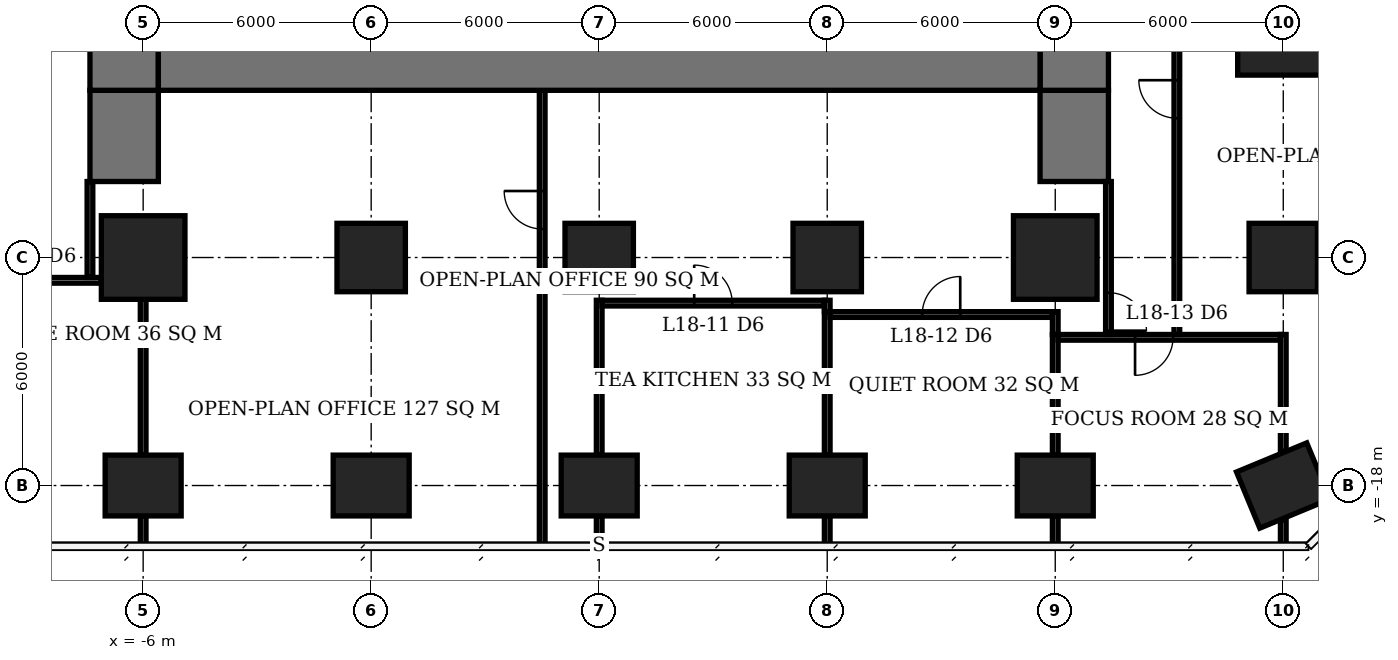
"""IFC4 building model, lengths in metres.
Left out: names, types, materials, properties, quantities, classifications, styles, units other than length and angle.
Written with IfcOpenShell. Run it as: python <this file> out.ifc"""

import sys

from ifc_helpers import new_model, si_unit, direction, frame, frame_2d, origin, origin_2d, place, context, subcontext, project, spatial, rectangle, extrude, element, fill, save


model = new_model("IFC4")
c1 = context("Model", 3, precision=1e-05, world=origin(), true_north=direction((0.0, 1.0)))
c2 = subcontext(c1, "Body", "Model", "MODEL_VIEW")
j1 = project(units=[si_unit("LENGTHUNIT", "METRE"), si_unit("PLANEANGLEUNIT", "RADIAN")], contexts=[c1])
p1 = place(None, origin())
s1 = spatial("IfcSite", under=j1, at=p1, CompositionType="ELEMENT")
p2 = place(p1, origin())
s2 = spatial("IfcBuilding", under=s1, at=p2, CompositionType="ELEMENT")
p3 = place(p2, frame((0.0, 0.0, 76.7)))
s3 = spatial("IfcBuildingStorey", under=s2, at=p3, CompositionType="ELEMENT", Elevation=76.7)
p4 = place(p3, frame((-6.0, -18.0, 0.0), z_axis=(0.0, 0.0, 1.0), x_axis=(1.0, 0.0, 0.0)))
e1 = element("IfcColumn", 1, at=p4, inside=s3, PredefinedType="COLUMN", context=c2, shape_type="SweptSolid", body=[
    extrude(rectangle(XDim=2.0, YDim=1.6, at=origin_2d()), origin(), (0.0, 0.0, 1.0), 3.9),
])
p5 = place(p3, frame((-6.0, -12.0, 0.0), z_axis=(0.0, 0.0, 1.0), x_axis=(1.0, 0.0, 0.0)))
e2 = element("IfcColumn", 2, at=p5, inside=s3, PredefinedType="COLUMN", context=c2, shape_type="SweptSolid", body=[
    extrude(rectangle(XDim=2.2, YDim=2.2, at=origin_2d()), origin(), (0.0, 0.0, 1.0), 3.9),
])
p6 = place(p3, frame((0.0, -18.0, 0.0), z_axis=(0.0, 0.0, 1.0), x_axis=(1.0, 0.0, 0.0)))
e3 = element("IfcColumn", 3, at=p6, inside=s3, PredefinedType="COLUMN", context=c2, shape_type="SweptSolid", body=[
    extrude(rectangle(XDim=2.0, YDim=1.6, at=origin_2d()), origin(), (0.0, 0.0, 1.0), 3.9),
])
p7 = place(p3, frame((0.0, -12.0, 0.0), z_axis=(0.0, 0.0, 1.0), x_axis=(1.0, 0.0, 0.0)))
e4 = element("IfcColumn", 4, at=p7, inside=s3, PredefinedType="COLUMN", context=c2, shape_type="SweptSolid", body=[
    extrude(rectangle(XDim=1.8, YDim=1.8, at=origin_2d()), origin(), (0.0, 0.0, 1.0), 3.9),
])
p8 = place(p3, frame((6.0, -18.0, 0.0), z_axis=(0.0, 0.0, 1.0), x_axis=(1.0, 0.0, 0.0)))
e5 = element("IfcColumn", 5, at=p8, inside=s3, PredefinedType="COLUMN", context=c2, shape_type="SweptSolid", body=[
    extrude(rectangle(XDim=2.0, YDim=1.6, at=origin_2d()), origin(), (0.0, 0.0, 1.0), 3.9),
])
p9 = place(p3, frame((6.0, -12.0, 0.0), z_axis=(0.0, 0.0, 1.0), x_axis=(1.0, 0.0, 0.0)))
e6 = element("IfcColumn", 6, at=p9, inside=s3, PredefinedType="COLUMN", context=c2, shape_type="SweptSolid", body=[
    extrude(rectangle(XDim=1.8, YDim=1.8, at=origin_2d()), origin(), (0.0, 0.0, 1.0), 3.9),
])
p10 = place(p3, frame((12.0, -18.0, 0.0), z_axis=(0.0, 0.0, 1.0), x_axis=(1.0, 0.0, 0.0)))
e7 = element("IfcColumn", 7, at=p10, inside=s3, PredefinedType="COLUMN", context=c2, shape_type="SweptSolid", body=[
    extrude(rectangle(XDim=2.0, YDim=1.6, at=origin_2d()), origin(), (0.0, 0.0, 1.0), 3.9),
])
p11 = place(p3, frame((12.0, -12.0, 0.0), z_axis=(0.0, 0.0, 1.0), x_axis=(1.0, 0.0, 0.0)))
e8 = element("IfcColumn", 8, at=p11, inside=s3, PredefinedType="COLUMN", context=c2, shape_type="SweptSolid", body=[
    extrude(rectangle(XDim=1.8, YDim=1.8, at=origin_2d()), origin(), (0.0, 0.0, 1.0), 3.9),
])
p12 = place(p3, frame((18.0, -18.0, 0.0), z_axis=(0.0, 0.0, 1.0), x_axis=(1.0, 0.0, 0.0)))
e9 = element("IfcColumn", 9, at=p12, inside=s3, PredefinedType="COLUMN", context=c2, shape_type="SweptSolid", body=[
    extrude(rectangle(XDim=2.0, YDim=1.6, at=origin_2d()), origin(), (0.0, 0.0, 1.0), 3.9),
])
p13 = place(p3, frame((18.0, -12.0, 0.0), z_axis=(0.0, 0.0, 1.0), x_axis=(1.0, 0.0, 0.0)))
e10 = element("IfcColumn", 10, at=p13, inside=s3, PredefinedType="COLUMN", context=c2, shape_type="SweptSolid", body=[
    extrude(rectangle(XDim=2.2, YDim=2.2, at=origin_2d()), origin(), (0.0, 0.0, 1.0), 3.9),
])
p14 = place(p3, frame((24.0, -18.0, 0.0), z_axis=(0.0, 0.0, 1.0), x_axis=(-0.923879532511, -0.382683432365, 0.0)))
e11 = element("IfcColumn", 11, at=p14, inside=s3, PredefinedType="COLUMN", context=c2, shape_type="SweptSolid", body=[
    extrude(rectangle(XDim=2.0, YDim=1.6, at=origin_2d()), origin(), (0.0, 0.0, 1.0), 3.9),
])
p15 = place(p3, frame((24.0, -12.0, 0.0), z_axis=(0.0, 0.0, 1.0), x_axis=(1.0, 0.0, 0.0)))
e12 = element("IfcColumn", 12, at=p15, inside=s3, PredefinedType="COLUMN", context=c2, shape_type="SweptSolid", body=[
    extrude(rectangle(XDim=1.8, YDim=1.8, at=origin_2d()), origin(), (0.0, 0.0, 1.0), 3.9),
])
p16 = place(p3, frame((24.0, -6.0, 0.0), z_axis=(0.0, 0.0, 1.0), x_axis=(1.0, 0.0, 0.0)))
e13 = element("IfcColumn", 13, at=p16, inside=s3, PredefinedType="COLUMN", context=c2, shape_type="SweptSolid", body=[
    extrude(rectangle(XDim=2.4, YDim=2.4, at=origin_2d()), origin(), (0.0, 0.0, 1.0), 3.9),
])
p17 = place(p3, frame((-5.6, -6.6, 0.0), z_axis=(0.0, 0.0, 1.0), x_axis=(1.0, 0.0, 0.0)))
e14 = element("IfcWall", 14, at=p17, inside=s3, PredefinedType="SHEAR", context=c2, shape_type="SweptSolid", body=[
    extrude(rectangle(XDim=23.2, YDim=2.0, at=frame_2d((11.6, 0.0))), origin(), (0.0, 0.0, 1.0), 3.9),
])
p18 = place(p3, frame((-6.5, -7.6, 0.0), z_axis=(0.0, 0.0, 1.0), x_axis=(0.0, 1.0, 0.0)))
e15 = element("IfcWall", 15, at=p18, inside=s3, PredefinedType="SHEAR", context=c2, shape_type="SweptSolid", body=[
    extrude(rectangle(XDim=21.2, YDim=1.8, at=frame_2d((10.6, 0.0))), origin(), (0.0, 0.0, 1.0), 3.9),
])
p19 = place(p18, frame((7.8, 0.0, 0.0)))
e16 = element("IfcOpeningElement", 16, at=p19, cuts=e15, PredefinedType="OPENING", context=c2, shape_type="SweptSolid", body=[
    extrude(rectangle(XDim=1.8, YDim=2.4, at=frame_2d((0.9, 1.2))), frame((0.0, 0.91, 0.0), z_axis=(0.0, -1.0, 0.0), x_axis=(1.0, 0.0, 0.0)), (0.0, 0.0, 1.0), 1.82),
])
p20 = place(p3, frame((18.5, -7.6, 0.0), z_axis=(0.0, 0.0, 1.0), x_axis=(0.0, 1.0, 0.0)))
e17 = element("IfcWall", 17, at=p20, inside=s3, PredefinedType="SHEAR", context=c2, shape_type="SweptSolid", body=[
    extrude(rectangle(XDim=21.2, YDim=1.8, at=frame_2d((10.6, 0.0))), origin(), (0.0, 0.0, 1.0), 3.9),
])
p21 = place(p20, frame((9.2, 0.0, 0.0)))
e18 = element("IfcOpeningElement", 18, at=p21, cuts=e17, PredefinedType="OPENING", context=c2, shape_type="SweptSolid", body=[
    extrude(rectangle(XDim=1.8, YDim=2.4, at=frame_2d((0.9, 1.2))), frame((0.0, 0.91, 0.0), z_axis=(0.0, -1.0, 0.0), x_axis=(1.0, 0.0, 0.0)), (0.0, 0.0, 1.0), 1.82),
])
for number, where, z_axis, x_axis in (
    (19, (-6.5, -10.0, 0.0), (0.0, 0.0, 1.0), (0.0, 1.0, 0.0)),
    (20, (18.5, -10.0, 0.0), (0.0, 0.0, 1.0), (0.0, 1.0, 0.0)),
):
    element("IfcWall", number, at=place(p3, frame(where, z_axis=z_axis, x_axis=x_axis)), inside=s3, PredefinedType="SHEAR", context=c2, shape_type="SweptSolid", body=[
        extrude(rectangle(XDim=2.4, YDim=1.8, at=frame_2d((1.2, 0.0))), origin(), (0.0, 0.0, 1.0), 3.9),
    ])
p22 = place(p3, frame((23.925, -14.1, 0.0), z_axis=(0.0, 0.0, 1.0), x_axis=(-1.0, 0.0, 0.0)))
e21 = element("IfcWall", 21, at=p22, inside=s3, PredefinedType="PARTITIONING", context=c2, shape_type="SweptSolid", body=[
    extrude(rectangle(XDim=5.85, YDim=0.15, at=frame_2d((2.925, 0.0))), origin(), (0.0, 0.0, 1.0), 3.65),
])
p23 = place(p22, frame((2.825, 0.0, 0.0)))
e22 = element("IfcOpeningElement", 22, at=p23, cuts=e21, PredefinedType="OPENING", context=c2, shape_type="SweptSolid", body=[
    extrude(rectangle(XDim=1.0, YDim=2.1, at=frame_2d((0.5, 1.05))), frame((0.0, 0.085, 0.0), z_axis=(0.0, -1.0, 0.0), x_axis=(1.0, 0.0, 0.0)), (0.0, 0.0, 1.0), 0.17),
])
p24 = place(p3, frame((12.075, -13.5, 0.0), z_axis=(0.0, 0.0, 1.0), x_axis=(1.0, 0.0, 0.0)))
e23 = element("IfcWall", 23, at=p24, inside=s3, PredefinedType="PARTITIONING", context=c2, shape_type="SweptSolid", body=[
    extrude(rectangle(XDim=5.85, YDim=0.15, at=frame_2d((2.925, 0.0))), origin(), (0.0, 0.0, 1.0), 3.65),
])
p25 = place(p24, frame((2.425, 0.0, 0.0)))
e24 = element("IfcOpeningElement", 24, at=p25, cuts=e23, PredefinedType="OPENING", context=c2, shape_type="SweptSolid", body=[
    extrude(rectangle(XDim=1.0, YDim=2.1, at=frame_2d((0.5, 1.05))), frame((0.0, 0.085, 0.0), z_axis=(0.0, -1.0, 0.0), x_axis=(1.0, 0.0, 0.0)), (0.0, 0.0, 1.0), 0.17),
])
p26 = place(p3, frame((6.075, -13.2, 0.0), z_axis=(0.0, 0.0, 1.0), x_axis=(1.0, 0.0, 0.0)))
e25 = element("IfcWall", 25, at=p26, inside=s3, PredefinedType="PARTITIONING", context=c2, shape_type="SweptSolid", body=[
    extrude(rectangle(XDim=5.85, YDim=0.15, at=frame_2d((2.925, 0.0))), origin(), (0.0, 0.0, 1.0), 3.65),
])
p27 = place(p26, frame((2.425, 0.0, 0.0)))
e26 = element("IfcOpeningElement", 26, at=p27, cuts=e25, PredefinedType="OPENING", context=c2, shape_type="SweptSolid", body=[
    extrude(rectangle(XDim=1.0, YDim=2.1, at=frame_2d((0.5, 1.05))), frame((0.0, 0.085, 0.0), z_axis=(0.0, -1.0, 0.0), x_axis=(1.0, 0.0, 0.0)), (0.0, 0.0, 1.0), 0.17),
])
p28 = place(p3, frame((-7.1, -12.6, 0.0), z_axis=(0.0, 0.0, 1.0), x_axis=(-1.0, 0.0, 0.0)))
e27 = element("IfcWall", 27, at=p28, inside=s3, PredefinedType="PARTITIONING", context=c2, shape_type="SweptSolid", body=[
    extrude(rectangle(XDim=4.0, YDim=0.15, at=frame_2d((2.0, 0.0))), origin(), (0.0, 0.0, 1.0), 3.65),
])
p29 = place(p28, frame((1.5, 0.0, 0.0)))
e28 = element("IfcOpeningElement", 28, at=p29, cuts=e27, PredefinedType="OPENING", context=c2, shape_type="SweptSolid", body=[
    extrude(rectangle(XDim=1.0, YDim=2.1, at=frame_2d((0.5, 1.05))), frame((0.0, 0.085, 0.0), z_axis=(0.0, -1.0, 0.0), x_axis=(1.0, 0.0, 0.0)), (0.0, 0.0, 1.0), 0.17),
])
p30 = place(p3, frame((-6.0, -19.6, 0.0), z_axis=(0.0, 0.0, 1.0), x_axis=(0.0, 1.0, 0.0)))
e29 = element("IfcWall", 29, at=p30, inside=s3, PredefinedType="PARTITIONING", context=c2, shape_type="SweptSolid", body=[
    extrude(rectangle(XDim=0.8, YDim=0.15, at=frame_2d((0.4, 0.0))), origin(), (0.0, 0.0, 1.0), 3.65),
])
p31 = place(p3, frame((-6.0, -17.2, 0.0), z_axis=(0.0, 0.0, 1.0), x_axis=(0.0, 1.0, 0.0)))
e30 = element("IfcWall", 30, at=p31, inside=s3, PredefinedType="PARTITIONING", context=c2, shape_type="SweptSolid", body=[
    extrude(rectangle(XDim=4.1, YDim=0.15, at=frame_2d((2.05, 0.0))), origin(), (0.0, 0.0, 1.0), 3.65),
])
p32 = place(p3, frame((6.0, -19.55, 0.0), z_axis=(0.0, 0.0, 1.0), x_axis=(0.0, 1.0, 0.0)))
e31 = element("IfcWall", 31, at=p32, inside=s3, PredefinedType="PARTITIONING", context=c2, shape_type="SweptSolid", body=[
    extrude(rectangle(XDim=0.75, YDim=0.15, at=frame_2d((0.375, 0.0))), origin(), (0.0, 0.0, 1.0), 3.65),
])
p33 = place(p3, frame((6.0, -17.2, 0.0), z_axis=(0.0, 0.0, 1.0), x_axis=(0.0, 1.0, 0.0)))
e32 = element("IfcWall", 32, at=p33, inside=s3, PredefinedType="PARTITIONING", context=c2, shape_type="SweptSolid", body=[
    extrude(rectangle(XDim=4.075, YDim=0.15, at=frame_2d((2.038, 0.0))), origin(), (0.0, 0.0, 1.0), 3.65),
])
p34 = place(p3, frame((12.0, -19.6, 0.0), z_axis=(0.0, 0.0, 1.0), x_axis=(0.0, 1.0, 0.0)))
e33 = element("IfcWall", 33, at=p34, inside=s3, PredefinedType="PARTITIONING", context=c2, shape_type="SweptSolid", body=[
    extrude(rectangle(XDim=0.8, YDim=0.15, at=frame_2d((0.4, 0.0))), origin(), (0.0, 0.0, 1.0), 3.65),
])
p35 = place(p3, frame((12.0, -17.2, 0.0), z_axis=(0.0, 0.0, 1.0), x_axis=(0.0, 1.0, 0.0)))
e34 = element("IfcWall", 34, at=p35, inside=s3, PredefinedType="PARTITIONING", context=c2, shape_type="SweptSolid", body=[
    extrude(rectangle(XDim=3.775, YDim=0.15, at=frame_2d((1.887, 0.0))), origin(), (0.0, 0.0, 1.0), 3.65),
])
p36 = place(p3, frame((12.0, -13.425, 0.0), z_axis=(0.0, 0.0, 1.0), x_axis=(0.0, 1.0, 0.0)))
e35 = element("IfcWall", 35, at=p36, inside=s3, PredefinedType="PARTITIONING", context=c2, shape_type="SweptSolid", body=[
    extrude(rectangle(XDim=0.3, YDim=0.15, at=frame_2d((0.15, 0.0))), origin(), (0.0, 0.0, 1.0), 3.65),
])
p37 = place(p3, frame((18.0, -19.6, 0.0), z_axis=(0.0, 0.0, 1.0), x_axis=(0.0, 1.0, 0.0)))
e36 = element("IfcWall", 36, at=p37, inside=s3, PredefinedType="PARTITIONING", context=c2, shape_type="SweptSolid", body=[
    extrude(rectangle(XDim=0.8, YDim=0.15, at=frame_2d((0.4, 0.0))), origin(), (0.0, 0.0, 1.0), 3.65),
])
p38 = place(p3, frame((18.0, -17.2, 0.0), z_axis=(0.0, 0.0, 1.0), x_axis=(0.0, 1.0, 0.0)))
e37 = element("IfcWall", 37, at=p38, inside=s3, PredefinedType="PARTITIONING", context=c2, shape_type="SweptSolid", body=[
    extrude(rectangle(XDim=3.175, YDim=0.15, at=frame_2d((1.587, 0.0))), origin(), (0.0, 0.0, 1.0), 3.65),
])
p39 = place(p3, frame((18.0, -14.025, 0.0), z_axis=(0.0, 0.0, 1.0), x_axis=(0.0, 1.0, 0.0)))
e38 = element("IfcWall", 38, at=p39, inside=s3, PredefinedType="PARTITIONING", context=c2, shape_type="SweptSolid", body=[
    extrude(rectangle(XDim=0.6, YDim=0.15, at=frame_2d((0.3, 0.0))), origin(), (0.0, 0.0, 1.0), 3.65),
])
p40 = place(p3, frame((24.0, -19.6, 0.0), z_axis=(0.0, 0.0, 1.0), x_axis=(0.0, 1.0, 0.0)))
e39 = element("IfcWall", 39, at=p40, inside=s3, PredefinedType="PARTITIONING", context=c2, shape_type="SweptSolid", body=[
    extrude(rectangle(XDim=0.703, YDim=0.15, at=frame_2d((0.352, 0.0))), origin(), (0.0, 0.0, 1.0), 3.65),
])
p41 = place(p3, frame((24.0, -17.103, 0.0), z_axis=(0.0, 0.0, 1.0), x_axis=(0.0, 1.0, 0.0)))
e40 = element("IfcWall", 40, at=p41, inside=s3, PredefinedType="PARTITIONING", context=c2, shape_type="SweptSolid", body=[
    extrude(rectangle(XDim=3.078, YDim=0.15, at=frame_2d((1.539, 0.0))), origin(), (0.0, 0.0, 1.0), 3.65),
])
p42 = place(p3, frame((-7.4, -12.525, 0.0), z_axis=(0.0, 0.0, 1.0), x_axis=(0.0, 1.0, 0.0)))
e41 = element("IfcWall", 41, at=p42, inside=s3, PredefinedType="PARTITIONING", context=c2, shape_type="SweptSolid", body=[
    extrude(rectangle(XDim=2.525, YDim=0.15, at=frame_2d((1.262, 0.0))), origin(), (0.0, 0.0, 1.0), 3.65),
])
p43 = place(p3, frame((4.5, -19.6, 0.0), z_axis=(0.0, 0.0, 1.0), x_axis=(0.0, 1.0, 0.0)))
e42 = element("IfcWall", 42, at=p43, inside=s3, PredefinedType="PARTITIONING", context=c2, shape_type="SweptSolid", body=[
    extrude(rectangle(XDim=12.0, YDim=0.15, at=frame_2d((6.0, 0.0))), origin(), (0.0, 0.0, 1.0), 3.65),
])
p44 = place(p43, frame((8.35, 0.0, 0.0)))
e43 = element("IfcOpeningElement", 43, at=p44, cuts=e42, PredefinedType="OPENING", context=c2, shape_type="SweptSolid", body=[
    extrude(rectangle(XDim=1.0, YDim=2.1, at=frame_2d((0.5, 1.05))), frame((0.0, 0.085, 0.0), z_axis=(0.0, -1.0, 0.0), x_axis=(1.0, 0.0, 0.0)), (0.0, 0.0, 1.0), 0.17),
])
p45 = place(p3, frame((19.4, -10.0, 0.0), z_axis=(0.0, 0.0, 1.0), x_axis=(0.0, -1.0, 0.0)))
e44 = element("IfcWall", 44, at=p45, inside=s3, PredefinedType="PARTITIONING", context=c2, shape_type="SweptSolid", body=[
    extrude(rectangle(XDim=4.025, YDim=0.15, at=frame_2d((2.012, 0.0))), origin(), (0.0, 0.0, 1.0), 3.65),
])
p46 = place(p45, frame((2.925, 0.0, 0.0)))
e45 = element("IfcOpeningElement", 45, at=p46, cuts=e44, PredefinedType="OPENING", context=c2, shape_type="SweptSolid", body=[
    extrude(rectangle(XDim=1.0, YDim=2.1, at=frame_2d((0.5, 1.05))), frame((0.0, 0.085, 0.0), z_axis=(0.0, -1.0, 0.0), x_axis=(1.0, 0.0, 0.0)), (0.0, 0.0, 1.0), 0.17),
])
p47 = place(p3, frame((21.2, -14.025, 0.0), z_axis=(0.0, 0.0, 1.0), x_axis=(0.0, 1.0, 0.0)))
e46 = element("IfcWall", 46, at=p47, inside=s3, PredefinedType="PARTITIONING", context=c2, shape_type="SweptSolid", body=[
    extrude(rectangle(XDim=9.45, YDim=0.15, at=frame_2d((4.725, 0.0))), origin(), (0.0, 0.0, 1.0), 3.65),
])
p48 = place(p47, frame((5.691, 0.0, 0.0)))
e47 = element("IfcOpeningElement", 47, at=p48, cuts=e46, PredefinedType="OPENING", context=c2, shape_type="SweptSolid", body=[
    extrude(rectangle(XDim=1.0, YDim=2.1, at=frame_2d((0.5, 1.05))), frame((0.0, 0.085, 0.0), z_axis=(0.0, -1.0, 0.0), x_axis=(1.0, 0.0, 0.0)), (0.0, 0.0, 1.0), 0.17),
])
p49 = place(p27, origin())
e48 = element("IfcDoor", 48, at=p49, inside=s3, OperationType="SINGLE_SWING_LEFT", PredefinedType="DOOR", context=c2, shape_type="SweptSolid", body=[
    extrude(rectangle(XDim=1.0, YDim=2.1, at=frame_2d((0.5, 1.05))), frame((0.0, 0.025, 0.0), z_axis=(0.0, -1.0, 0.0), x_axis=(1.0, 0.0, 0.0)), (0.0, 0.0, 1.0), 0.05),
])
fill(e26, e48)
p50 = place(p25, origin())
e49 = element("IfcDoor", 49, at=p50, inside=s3, OperationType="SINGLE_SWING_RIGHT", PredefinedType="DOOR", context=c2, shape_type="SweptSolid", body=[
    extrude(rectangle(XDim=1.0, YDim=2.1, at=frame_2d((0.5, 1.05))), frame((0.0, 0.025, 0.0), z_axis=(0.0, -1.0, 0.0), x_axis=(1.0, 0.0, 0.0)), (0.0, 0.0, 1.0), 0.05),
])
fill(e24, e49)
p51 = place(p23, origin())
e50 = element("IfcDoor", 50, at=p51, inside=s3, OperationType="SINGLE_SWING_RIGHT", PredefinedType="DOOR", context=c2, shape_type="SweptSolid", body=[
    extrude(rectangle(XDim=1.0, YDim=2.1, at=frame_2d((0.5, 1.05))), frame((0.0, 0.025, 0.0), z_axis=(0.0, -1.0, 0.0), x_axis=(1.0, 0.0, 0.0)), (0.0, 0.0, 1.0), 0.05),
])
fill(e22, e50)
p52 = place(p48, origin())
e51 = element("IfcDoor", 51, at=p52, inside=s3, OperationType="SINGLE_SWING_RIGHT", PredefinedType="DOOR", context=c2, shape_type="SweptSolid", body=[
    extrude(rectangle(XDim=1.0, YDim=2.1, at=frame_2d((0.5, 1.05))), frame((0.0, 0.025, 0.0), z_axis=(0.0, -1.0, 0.0), x_axis=(1.0, 0.0, 0.0)), (0.0, 0.0, 1.0), 0.05),
])
fill(e47, e51)
p53 = place(p44, origin())
e52 = element("IfcDoor", 52, at=p53, inside=s3, OperationType="SINGLE_SWING_RIGHT", PredefinedType="DOOR", context=c2, shape_type="SweptSolid", body=[
    extrude(rectangle(XDim=1.0, YDim=2.1, at=frame_2d((0.5, 1.05))), frame((0.0, 0.025, 0.0), z_axis=(0.0, -1.0, 0.0), x_axis=(1.0, 0.0, 0.0)), (0.0, 0.0, 1.0), 0.05),
])
fill(e43, e52)
p54 = place(p46, origin())
e53 = element("IfcDoor", 53, at=p54, inside=s3, OperationType="SINGLE_SWING_RIGHT", PredefinedType="DOOR", context=c2, shape_type="SweptSolid", body=[
    extrude(rectangle(XDim=1.0, YDim=2.1, at=frame_2d((0.5, 1.05))), frame((0.0, 0.025, 0.0), z_axis=(0.0, -1.0, 0.0), x_axis=(1.0, 0.0, 0.0)), (0.0, 0.0, 1.0), 0.05),
])
fill(e45, e53)
save(model, sys.argv[1])
